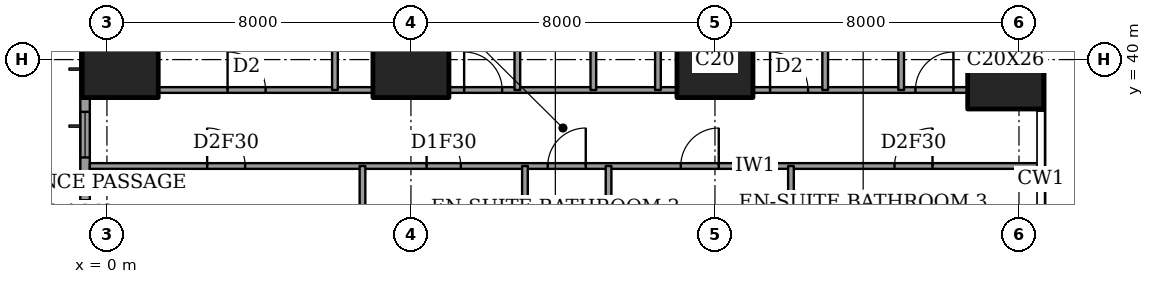
"""IFC4 building model, lengths in metres.
Left out: names, types, materials, properties, quantities, classifications, styles, units other than length and angle.
Written with IfcOpenShell. Run it as: python <this file> out.ifc"""

import sys

from ifc_helpers import new_model, si_unit, direction, frame, frame_2d, origin, origin_2d, place, context, subcontext, project, spatial, rectangle, extrude, element, fill, save


model = new_model("IFC4")
c1 = context("Model", 3, precision=1e-05, world=origin(), true_north=direction((0.0, 1.0)))
c2 = subcontext(c1, "Body", "Model", "MODEL_VIEW")
j1 = project(units=[si_unit("LENGTHUNIT", "METRE"), si_unit("PLANEANGLEUNIT", "RADIAN")], contexts=[c1])
p1 = place(None, origin())
s1 = spatial("IfcSite", under=j1, at=p1, CompositionType="ELEMENT")
p2 = place(p1, origin())
s2 = spatial("IfcBuilding", under=s1, at=p2, CompositionType="ELEMENT")
p3 = place(p2, frame((0.0, 0.0, 128.6)))
s3 = spatial("IfcBuildingStorey", under=s2, at=p3, CompositionType="ELEMENT", Elevation=128.6)
for number, where, z_axis, x_axis in (
    (1, (0.35, 40.0, 0.0), (0.0, 0.0, 1.0), (1.0, 0.0, 0.0)),
    (2, (8.0, 40.0, 0.0), (0.0, 0.0, 1.0), (1.0, 0.0, 0.0)),
    (3, (16.0, 40.0, 0.0), (0.0, 0.0, 1.0), (1.0, 0.0, 0.0)),
):
    element("IfcColumn", number, at=place(p3, frame(where, z_axis=z_axis, x_axis=x_axis)), inside=s3, PredefinedType="COLUMN", context=c2, shape_type="SweptSolid", body=[
        extrude(rectangle(XDim=2.0, YDim=2.0, at=origin_2d()), origin(), (0.0, 0.0, 1.0), 3.6),
    ])
p4 = place(p3, frame((23.65, 40.0, 0.0), z_axis=(0.0, 0.0, 1.0), x_axis=(1.0, 0.0, 0.0)))
e4 = element("IfcColumn", 4, at=p4, inside=s3, PredefinedType="COLUMN", context=c2, shape_type="SweptSolid", body=[
    extrude(rectangle(XDim=2.0, YDim=2.6, at=origin_2d()), origin(), (0.0, 0.0, 1.0), 3.6),
])
p5 = place(p3, frame((-0.575, 44.825, 0.0), z_axis=(0.0, 0.0, 1.0), x_axis=(0.0, -1.0, 0.0)))
e5 = element("IfcWall", 5, at=p5, inside=s3, PredefinedType="SOLIDWALL", context=c2, shape_type="SweptSolid", body=[
    extrude(rectangle(XDim=41.65, YDim=0.25, at=frame_2d((20.825, 0.0))), origin(), (0.0, 0.0, 1.0), 3.6),
])
p6 = place(p5, frame((0.775, 0.0, 0.4)))
e6 = element("IfcOpeningElement", 6, at=p6, cuts=e5, PredefinedType="OPENING", context=c2, shape_type="SweptSolid", body=[
    extrude(rectangle(XDim=2.4, YDim=2.2, at=frame_2d((1.2, 1.1))), frame((0.0, 0.135, 0.0), z_axis=(0.0, -1.0, 0.0), x_axis=(1.0, 0.0, 0.0)), (0.0, 0.0, 1.0), 0.27),
])
p7 = place(p5, frame((6.2, 0.0, 0.4)))
e7 = element("IfcOpeningElement", 7, at=p7, cuts=e5, PredefinedType="OPENING", context=c2, shape_type="SweptSolid", body=[
    extrude(rectangle(XDim=1.2, YDim=2.2, at=frame_2d((0.6, 1.1))), frame((0.0, 0.135, 0.0), z_axis=(0.0, -1.0, 0.0), x_axis=(1.0, 0.0, 0.0)), (0.0, 0.0, 1.0), 0.27),
])
p8 = place(p5, frame((8.525, 0.0, 0.4)))
e8 = element("IfcOpeningElement", 8, at=p8, cuts=e5, PredefinedType="OPENING", context=c2, shape_type="SweptSolid", body=[
    extrude(rectangle(XDim=2.4, YDim=2.2, at=frame_2d((1.2, 1.1))), frame((0.0, 0.135, 0.0), z_axis=(0.0, -1.0, 0.0), x_axis=(1.0, 0.0, 0.0)), (0.0, 0.0, 1.0), 0.27),
])
p9 = place(p5, frame((15.625, 0.0, 0.4)))
e9 = element("IfcOpeningElement", 9, at=p9, cuts=e5, PredefinedType="OPENING", context=c2, shape_type="SweptSolid", body=[
    extrude(rectangle(XDim=2.4, YDim=2.2, at=frame_2d((1.2, 1.1))), frame((0.0, 0.135, 0.0), z_axis=(0.0, -1.0, 0.0), x_axis=(1.0, 0.0, 0.0)), (0.0, 0.0, 1.0), 0.27),
])
p10 = place(p5, frame((23.625, 0.0, 0.4)))
e10 = element("IfcOpeningElement", 10, at=p10, cuts=e5, PredefinedType="OPENING", context=c2, shape_type="SweptSolid", body=[
    extrude(rectangle(XDim=2.4, YDim=2.2, at=frame_2d((1.2, 1.1))), frame((0.0, 0.135, 0.0), z_axis=(0.0, -1.0, 0.0), x_axis=(1.0, 0.0, 0.0)), (0.0, 0.0, 1.0), 0.27),
])
p11 = place(p5, frame((30.825, 0.0, 0.4)))
e11 = element("IfcOpeningElement", 11, at=p11, cuts=e5, PredefinedType="OPENING", context=c2, shape_type="SweptSolid", body=[
    extrude(rectangle(XDim=2.4, YDim=2.2, at=frame_2d((1.2, 1.1))), frame((0.0, 0.135, 0.0), z_axis=(0.0, -1.0, 0.0), x_axis=(1.0, 0.0, 0.0)), (0.0, 0.0, 1.0), 0.27),
])
p12 = place(p5, frame((34.5, 0.0, 0.4)))
e12 = element("IfcOpeningElement", 12, at=p12, cuts=e5, PredefinedType="OPENING", context=c2, shape_type="SweptSolid", body=[
    extrude(rectangle(XDim=1.2, YDim=2.2, at=frame_2d((0.6, 1.1))), frame((0.0, 0.135, 0.0), z_axis=(0.0, -1.0, 0.0), x_axis=(1.0, 0.0, 0.0)), (0.0, 0.0, 1.0), 0.27),
])
p13 = place(p5, frame((38.475, 0.0, 0.4)))
e13 = element("IfcOpeningElement", 13, at=p13, cuts=e5, PredefinedType="OPENING", context=c2, shape_type="SweptSolid", body=[
    extrude(rectangle(XDim=2.4, YDim=2.2, at=frame_2d((1.2, 1.1))), frame((0.0, 0.135, 0.0), z_axis=(0.0, -1.0, 0.0), x_axis=(1.0, 0.0, 0.0)), (0.0, 0.0, 1.0), 0.27),
])
p14 = place(p3, frame((-0.45, 37.2, 0.0), z_axis=(0.0, 0.0, 1.0), x_axis=(1.0, 0.0, 0.0)))
e14 = element("IfcWall", 14, at=p14, inside=s3, PredefinedType="PARTITIONING", context=c2, shape_type="SweptSolid", body=[
    extrude(rectangle(XDim=25.011, YDim=0.15, at=frame_2d((12.505, 0.0))), origin(), (0.0, 0.0, 1.0), 3.35),
])
p15 = place(p14, frame((12.05, 0.0, 0.0)))
e15 = element("IfcOpeningElement", 15, at=p15, cuts=e14, PredefinedType="OPENING", context=c2, shape_type="SweptSolid", body=[
    extrude(rectangle(XDim=1.0, YDim=2.1, at=frame_2d((0.5, 1.05))), frame((0.0, 0.085, 0.0), z_axis=(0.0, -1.0, 0.0), x_axis=(1.0, 0.0, 0.0)), (0.0, 0.0, 1.0), 0.17),
])
p16 = place(p14, frame((3.087, 0.0, 0.0)))
e16 = element("IfcOpeningElement", 16, at=p16, cuts=e14, PredefinedType="OPENING", context=c2, shape_type="SweptSolid", body=[
    extrude(rectangle(XDim=1.0, YDim=2.1, at=frame_2d((0.5, 1.05))), frame((0.0, 0.085, 0.0), z_axis=(0.0, -1.0, 0.0), x_axis=(1.0, 0.0, 0.0)), (0.0, 0.0, 1.0), 0.17),
])
p17 = place(p14, frame((8.863, 0.0, 0.0)))
e17 = element("IfcOpeningElement", 17, at=p17, cuts=e14, PredefinedType="OPENING", context=c2, shape_type="SweptSolid", body=[
    extrude(rectangle(XDim=0.9, YDim=2.1, at=frame_2d((0.45, 1.05))), frame((0.0, 0.085, 0.0), z_axis=(0.0, -1.0, 0.0), x_axis=(1.0, 0.0, 0.0)), (0.0, 0.0, 1.0), 0.17),
])
p18 = place(p14, frame((15.55, 0.0, 0.0)))
e18 = element("IfcOpeningElement", 18, at=p18, cuts=e14, PredefinedType="OPENING", context=c2, shape_type="SweptSolid", body=[
    extrude(rectangle(XDim=1.0, YDim=2.1, at=frame_2d((0.5, 1.05))), frame((0.0, 0.085, 0.0), z_axis=(0.0, -1.0, 0.0), x_axis=(1.0, 0.0, 0.0)), (0.0, 0.0, 1.0), 0.17),
])
p19 = place(p14, frame((21.175, 0.0, 0.0)))
e19 = element("IfcOpeningElement", 19, at=p19, cuts=e14, PredefinedType="OPENING", context=c2, shape_type="SweptSolid", body=[
    extrude(rectangle(XDim=1.0, YDim=2.1, at=frame_2d((0.5, 1.05))), frame((0.0, 0.085, 0.0), z_axis=(0.0, -1.0, 0.0), x_axis=(1.0, 0.0, 0.0)), (0.0, 0.0, 1.0), 0.17),
])
p20 = place(p3, frame((1.35, 39.2, 0.0), z_axis=(0.0, 0.0, 1.0), x_axis=(1.0, 0.0, 0.0)))
e20 = element("IfcWall", 20, at=p20, inside=s3, PredefinedType="PARTITIONING", context=c2, shape_type="SweptSolid", body=[
    extrude(rectangle(XDim=5.65, YDim=0.15, at=frame_2d((2.825, 0.0))), origin(), (0.0, 0.0, 1.0), 3.35),
])
p21 = place(p20, frame((1.825, 0.0, 0.0)))
e21 = element("IfcOpeningElement", 21, at=p21, cuts=e20, PredefinedType="OPENING", context=c2, shape_type="SweptSolid", body=[
    extrude(rectangle(XDim=1.0, YDim=2.1, at=frame_2d((0.5, 1.05))), frame((0.0, 0.085, 0.0), z_axis=(0.0, -1.0, 0.0), x_axis=(1.0, 0.0, 0.0)), (0.0, 0.0, 1.0), 0.17),
])
p22 = place(p3, frame((9.0, 39.2, 0.0), z_axis=(0.0, 0.0, 1.0), x_axis=(1.0, 0.0, 0.0)))
e22 = element("IfcWall", 22, at=p22, inside=s3, PredefinedType="PARTITIONING", context=c2, shape_type="SweptSolid", body=[
    extrude(rectangle(XDim=6.0, YDim=0.15, at=frame_2d((3.0, 0.0))), origin(), (0.0, 0.0, 1.0), 3.35),
])
p23 = place(p22, frame((0.4, 0.0, 0.0)))
e23 = element("IfcOpeningElement", 23, at=p23, cuts=e22, PredefinedType="OPENING", context=c2, shape_type="SweptSolid", body=[
    extrude(rectangle(XDim=1.0, YDim=2.1, at=frame_2d((0.5, 1.05))), frame((0.0, 0.085, 0.0), z_axis=(0.0, -1.0, 0.0), x_axis=(1.0, 0.0, 0.0)), (0.0, 0.0, 1.0), 0.17),
])
p24 = place(p3, frame((17.0, 39.2, 0.0), z_axis=(0.0, 0.0, 1.0), x_axis=(1.0, 0.0, 0.0)))
e24 = element("IfcWall", 24, at=p24, inside=s3, PredefinedType="PARTITIONING", context=c2, shape_type="SweptSolid", body=[
    extrude(rectangle(XDim=5.65, YDim=0.15, at=frame_2d((2.825, 0.0))), origin(), (0.0, 0.0, 1.0), 3.35),
])
p25 = place(p24, frame((0.45, 0.0, 0.0)))
e25 = element("IfcOpeningElement", 25, at=p25, cuts=e24, PredefinedType="OPENING", context=c2, shape_type="SweptSolid", body=[
    extrude(rectangle(XDim=1.0, YDim=2.1, at=frame_2d((0.5, 1.05))), frame((0.0, 0.085, 0.0), z_axis=(0.0, -1.0, 0.0), x_axis=(1.0, 0.0, 0.0)), (0.0, 0.0, 1.0), 0.17),
])
p26 = place(p24, frame((4.275, 0.0, 0.0)))
e26 = element("IfcOpeningElement", 26, at=p26, cuts=e24, PredefinedType="OPENING", context=c2, shape_type="SweptSolid", body=[
    extrude(rectangle(XDim=1.0, YDim=2.1, at=frame_2d((0.5, 1.05))), frame((0.0, 0.085, 0.0), z_axis=(0.0, -1.0, 0.0), x_axis=(1.0, 0.0, 0.0)), (0.0, 0.0, 1.0), 0.17),
])
p27 = place(p3, frame((6.0, 39.2, 0.0), z_axis=(0.0, 0.0, 1.0), x_axis=(0.0, 1.0, 0.0)))
e27 = element("IfcWall", 27, at=p27, inside=s3, PredefinedType="PARTITIONING", context=c2, shape_type="SweptSolid", body=[
    extrude(rectangle(XDim=9.25, YDim=0.15, at=frame_2d((4.625, 0.0))), origin(), (0.0, 0.0, 1.0), 3.35),
])
p28 = place(p3, frame((6.725, 33.2, 0.0), z_axis=(0.0, 0.0, 1.0), x_axis=(0.0, 1.0, 0.0)))
e28 = element("IfcWall", 28, at=p28, inside=s3, PredefinedType="PARTITIONING", context=c2, shape_type="SweptSolid", body=[
    extrude(rectangle(XDim=4.0, YDim=0.15, at=frame_2d((2.0, 0.0))), origin(), (0.0, 0.0, 1.0), 3.35),
])
p29 = place(p3, frame((10.8, 39.2, 0.0), z_axis=(0.0, 0.0, 1.0), x_axis=(0.0, 1.0, 0.0)))
e29 = element("IfcWall", 29, at=p29, inside=s3, PredefinedType="PARTITIONING", context=c2, shape_type="SweptSolid", body=[
    extrude(rectangle(XDim=3.4, YDim=0.15, at=frame_2d((1.7, 0.0))), origin(), (0.0, 0.0, 1.0), 3.35),
])
p30 = place(p29, frame((1.25, 0.0, 0.0)))
e30 = element("IfcOpeningElement", 30, at=p30, cuts=e29, PredefinedType="OPENING", context=c2, shape_type="SweptSolid", body=[
    extrude(rectangle(XDim=0.9, YDim=2.1, at=frame_2d((0.45, 1.05))), frame((0.0, 0.085, 0.0), z_axis=(0.0, -1.0, 0.0), x_axis=(1.0, 0.0, 0.0)), (0.0, 0.0, 1.0), 0.17),
])
p31 = place(p3, frame((11.0, 28.0, 0.0), z_axis=(0.0, 0.0, 1.0), x_axis=(0.0, 1.0, 0.0)))
e31 = element("IfcWall", 31, at=p31, inside=s3, PredefinedType="PARTITIONING", context=c2, shape_type="SweptSolid", body=[
    extrude(rectangle(XDim=9.2, YDim=0.15, at=frame_2d((4.6, 0.0))), origin(), (0.0, 0.0, 1.0), 3.35),
])
p32 = place(p31, frame((0.837, 0.0, 0.0)))
e32 = element("IfcOpeningElement", 32, at=p32, cuts=e31, PredefinedType="OPENING", context=c2, shape_type="SweptSolid", body=[
    extrude(rectangle(XDim=1.0, YDim=2.1, at=frame_2d((0.5, 1.05))), frame((0.0, 0.085, 0.0), z_axis=(0.0, -1.0, 0.0), x_axis=(1.0, 0.0, 0.0)), (0.0, 0.0, 1.0), 0.17),
])
p33 = place(p3, frame((12.8, 39.2, 0.0), z_axis=(0.0, 0.0, 1.0), x_axis=(0.0, 1.0, 0.0)))
e33 = element("IfcWall", 33, at=p33, inside=s3, PredefinedType="PARTITIONING", context=c2, shape_type="SweptSolid", body=[
    extrude(rectangle(XDim=9.25, YDim=0.15, at=frame_2d((4.625, 0.0))), origin(), (0.0, 0.0, 1.0), 3.35),
])
p34 = place(p33, frame((5.875, 0.0, 0.0)))
e34 = element("IfcOpeningElement", 34, at=p34, cuts=e33, PredefinedType="OPENING", context=c2, shape_type="SweptSolid", body=[
    extrude(rectangle(XDim=0.9, YDim=2.1, at=frame_2d((0.45, 1.05))), frame((0.0, 0.085, 0.0), z_axis=(0.0, -1.0, 0.0), x_axis=(1.0, 0.0, 0.0)), (0.0, 0.0, 1.0), 0.17),
])
p35 = place(p3, frame((13.2, 30.675, 0.0), z_axis=(0.0, 0.0, 1.0), x_axis=(0.0, 1.0, 0.0)))
e35 = element("IfcWall", 35, at=p35, inside=s3, PredefinedType="PARTITIONING", context=c2, shape_type="SweptSolid", body=[
    extrude(rectangle(XDim=6.525, YDim=0.15, at=frame_2d((3.262, 0.0))), origin(), (0.0, 0.0, 1.0), 3.35),
])
p36 = place(p3, frame((14.5, 39.2, 0.0), z_axis=(0.0, 0.0, 1.0), x_axis=(0.0, 1.0, 0.0)))
e36 = element("IfcWall", 36, at=p36, inside=s3, PredefinedType="PARTITIONING", context=c2, shape_type="SweptSolid", body=[
    extrude(rectangle(XDim=9.25, YDim=0.15, at=frame_2d((4.625, 0.0))), origin(), (0.0, 0.0, 1.0), 3.35),
])
p37 = place(p3, frame((18.0, 28.0, 0.0), z_axis=(0.0, 0.0, 1.0), x_axis=(0.0, 1.0, 0.0)))
e37 = element("IfcWall", 37, at=p37, inside=s3, PredefinedType="PARTITIONING", context=c2, shape_type="SweptSolid", body=[
    extrude(rectangle(XDim=9.2, YDim=0.15, at=frame_2d((4.6, 0.0))), origin(), (0.0, 0.0, 1.0), 3.35),
])
p38 = place(p37, frame((0.837, 0.0, 0.0)))
e38 = element("IfcOpeningElement", 38, at=p38, cuts=e37, PredefinedType="OPENING", context=c2, shape_type="SweptSolid", body=[
    extrude(rectangle(XDim=1.0, YDim=2.1, at=frame_2d((0.5, 1.05))), frame((0.0, 0.085, 0.0), z_axis=(0.0, -1.0, 0.0), x_axis=(1.0, 0.0, 0.0)), (0.0, 0.0, 1.0), 0.17),
])
p39 = place(p3, frame((18.9, 39.2, 0.0), z_axis=(0.0, 0.0, 1.0), x_axis=(0.0, 1.0, 0.0)))
e39 = element("IfcWall", 39, at=p39, inside=s3, PredefinedType="PARTITIONING", context=c2, shape_type="SweptSolid", body=[
    extrude(rectangle(XDim=3.7, YDim=0.15, at=frame_2d((1.85, 0.0))), origin(), (0.0, 0.0, 1.0), 3.35),
])
p40 = place(p39, frame((1.4, 0.0, 0.0)))
e40 = element("IfcOpeningElement", 40, at=p40, cuts=e39, PredefinedType="OPENING", context=c2, shape_type="SweptSolid", body=[
    extrude(rectangle(XDim=0.9, YDim=2.1, at=frame_2d((0.45, 1.05))), frame((0.0, 0.085, 0.0), z_axis=(0.0, -1.0, 0.0), x_axis=(1.0, 0.0, 0.0)), (0.0, 0.0, 1.0), 0.17),
])
p41 = place(p3, frame((20.9, 39.2, 0.0), z_axis=(0.0, 0.0, 1.0), x_axis=(0.0, 1.0, 0.0)))
e41 = element("IfcWall", 41, at=p41, inside=s3, PredefinedType="PARTITIONING", context=c2, shape_type="SweptSolid", body=[
    extrude(rectangle(XDim=9.25, YDim=0.15, at=frame_2d((4.625, 0.0))), origin(), (0.0, 0.0, 1.0), 3.35),
])
p42 = place(p7, origin())
e42 = element("IfcWindow", 42, at=p42, inside=s3, PartitioningType="SINGLE_PANEL", PredefinedType="WINDOW", context=c2, shape_type="SweptSolid", body=[
    extrude(rectangle(XDim=1.2, YDim=2.2, at=frame_2d((0.6, 1.1))), frame((0.0, 0.03, 0.0), z_axis=(0.0, -1.0, 0.0), x_axis=(1.0, 0.0, 0.0)), (0.0, 0.0, 1.0), 0.06),
])
fill(e7, e42)
p43 = place(p8, origin())
e43 = element("IfcWindow", 43, at=p43, inside=s3, PartitioningType="SINGLE_PANEL", PredefinedType="WINDOW", context=c2, shape_type="SweptSolid", body=[
    extrude(rectangle(XDim=2.4, YDim=2.2, at=frame_2d((1.2, 1.1))), frame((0.0, 0.03, 0.0), z_axis=(0.0, -1.0, 0.0), x_axis=(1.0, 0.0, 0.0)), (0.0, 0.0, 1.0), 0.06),
])
fill(e8, e43)
p44 = place(p21, origin())
e44 = element("IfcDoor", 44, at=p44, inside=s3, OperationType="SINGLE_SWING_RIGHT", PredefinedType="DOOR", context=c2, shape_type="SweptSolid", body=[
    extrude(rectangle(XDim=1.0, YDim=2.1, at=frame_2d((0.5, 1.05))), frame((0.0, 0.025, 0.0), z_axis=(0.0, -1.0, 0.0), x_axis=(1.0, 0.0, 0.0)), (0.0, 0.0, 1.0), 0.05),
])
fill(e21, e44)
p45 = place(p23, origin())
e45 = element("IfcDoor", 45, at=p45, inside=s3, OperationType="SINGLE_SWING_RIGHT", PredefinedType="DOOR", context=c2, shape_type="SweptSolid", body=[
    extrude(rectangle(XDim=1.0, YDim=2.1, at=frame_2d((0.5, 1.05))), frame((0.0, 0.025, 0.0), z_axis=(0.0, -1.0, 0.0), x_axis=(1.0, 0.0, 0.0)), (0.0, 0.0, 1.0), 0.05),
])
fill(e23, e45)
p46 = place(p25, origin())
e46 = element("IfcDoor", 46, at=p46, inside=s3, OperationType="SINGLE_SWING_RIGHT", PredefinedType="DOOR", context=c2, shape_type="SweptSolid", body=[
    extrude(rectangle(XDim=1.0, YDim=2.1, at=frame_2d((0.5, 1.05))), frame((0.0, 0.025, 0.0), z_axis=(0.0, -1.0, 0.0), x_axis=(1.0, 0.0, 0.0)), (0.0, 0.0, 1.0), 0.05),
])
fill(e25, e46)
p47 = place(p26, origin())
e47 = element("IfcDoor", 47, at=p47, inside=s3, OperationType="SINGLE_SWING_LEFT", PredefinedType="DOOR", context=c2, shape_type="SweptSolid", body=[
    extrude(rectangle(XDim=1.0, YDim=2.1, at=frame_2d((0.5, 1.05))), frame((0.0, 0.025, 0.0), z_axis=(0.0, -1.0, 0.0), x_axis=(1.0, 0.0, 0.0)), (0.0, 0.0, 1.0), 0.05),
])
fill(e26, e47)
p48 = place(p15, origin())
e48 = element("IfcDoor", 48, at=p48, inside=s3, OperationType="SINGLE_SWING_LEFT", PredefinedType="DOOR", context=c2, shape_type="SweptSolid", body=[
    extrude(rectangle(XDim=1.0, YDim=2.1, at=frame_2d((0.5, 1.05))), frame((0.0, 0.025, 0.0), z_axis=(0.0, -1.0, 0.0), x_axis=(1.0, 0.0, 0.0)), (0.0, 0.0, 1.0), 0.05),
])
fill(e15, e48)
p49 = place(p16, origin())
e49 = element("IfcDoor", 49, at=p49, inside=s3, OperationType="SINGLE_SWING_RIGHT", PredefinedType="DOOR", context=c2, shape_type="SweptSolid", body=[
    extrude(rectangle(XDim=1.0, YDim=2.1, at=frame_2d((0.5, 1.05))), frame((0.0, 0.025, 0.0), z_axis=(0.0, -1.0, 0.0), x_axis=(1.0, 0.0, 0.0)), (0.0, 0.0, 1.0), 0.05),
])
fill(e16, e49)
p50 = place(p17, origin())
e50 = element("IfcDoor", 50, at=p50, inside=s3, OperationType="SINGLE_SWING_RIGHT", PredefinedType="DOOR", context=c2, shape_type="SweptSolid", body=[
    extrude(rectangle(XDim=0.9, YDim=2.1, at=frame_2d((0.45, 1.05))), frame((0.0, 0.025, 0.0), z_axis=(0.0, -1.0, 0.0), x_axis=(1.0, 0.0, 0.0)), (0.0, 0.0, 1.0), 0.05),
])
fill(e17, e50)
p51 = place(p18, origin())
e51 = element("IfcDoor", 51, at=p51, inside=s3, OperationType="SINGLE_SWING_LEFT", PredefinedType="DOOR", context=c2, shape_type="SweptSolid", body=[
    extrude(rectangle(XDim=1.0, YDim=2.1, at=frame_2d((0.5, 1.05))), frame((0.0, 0.025, 0.0), z_axis=(0.0, -1.0, 0.0), x_axis=(1.0, 0.0, 0.0)), (0.0, 0.0, 1.0), 0.05),
])
fill(e18, e51)
p52 = place(p19, origin())
e52 = element("IfcDoor", 52, at=p52, inside=s3, OperationType="SINGLE_SWING_LEFT", PredefinedType="DOOR", context=c2, shape_type="SweptSolid", body=[
    extrude(rectangle(XDim=1.0, YDim=2.1, at=frame_2d((0.5, 1.05))), frame((0.0, 0.025, 0.0), z_axis=(0.0, -1.0, 0.0), x_axis=(1.0, 0.0, 0.0)), (0.0, 0.0, 1.0), 0.05),
])
fill(e19, e52)
save(model, sys.argv[1])
